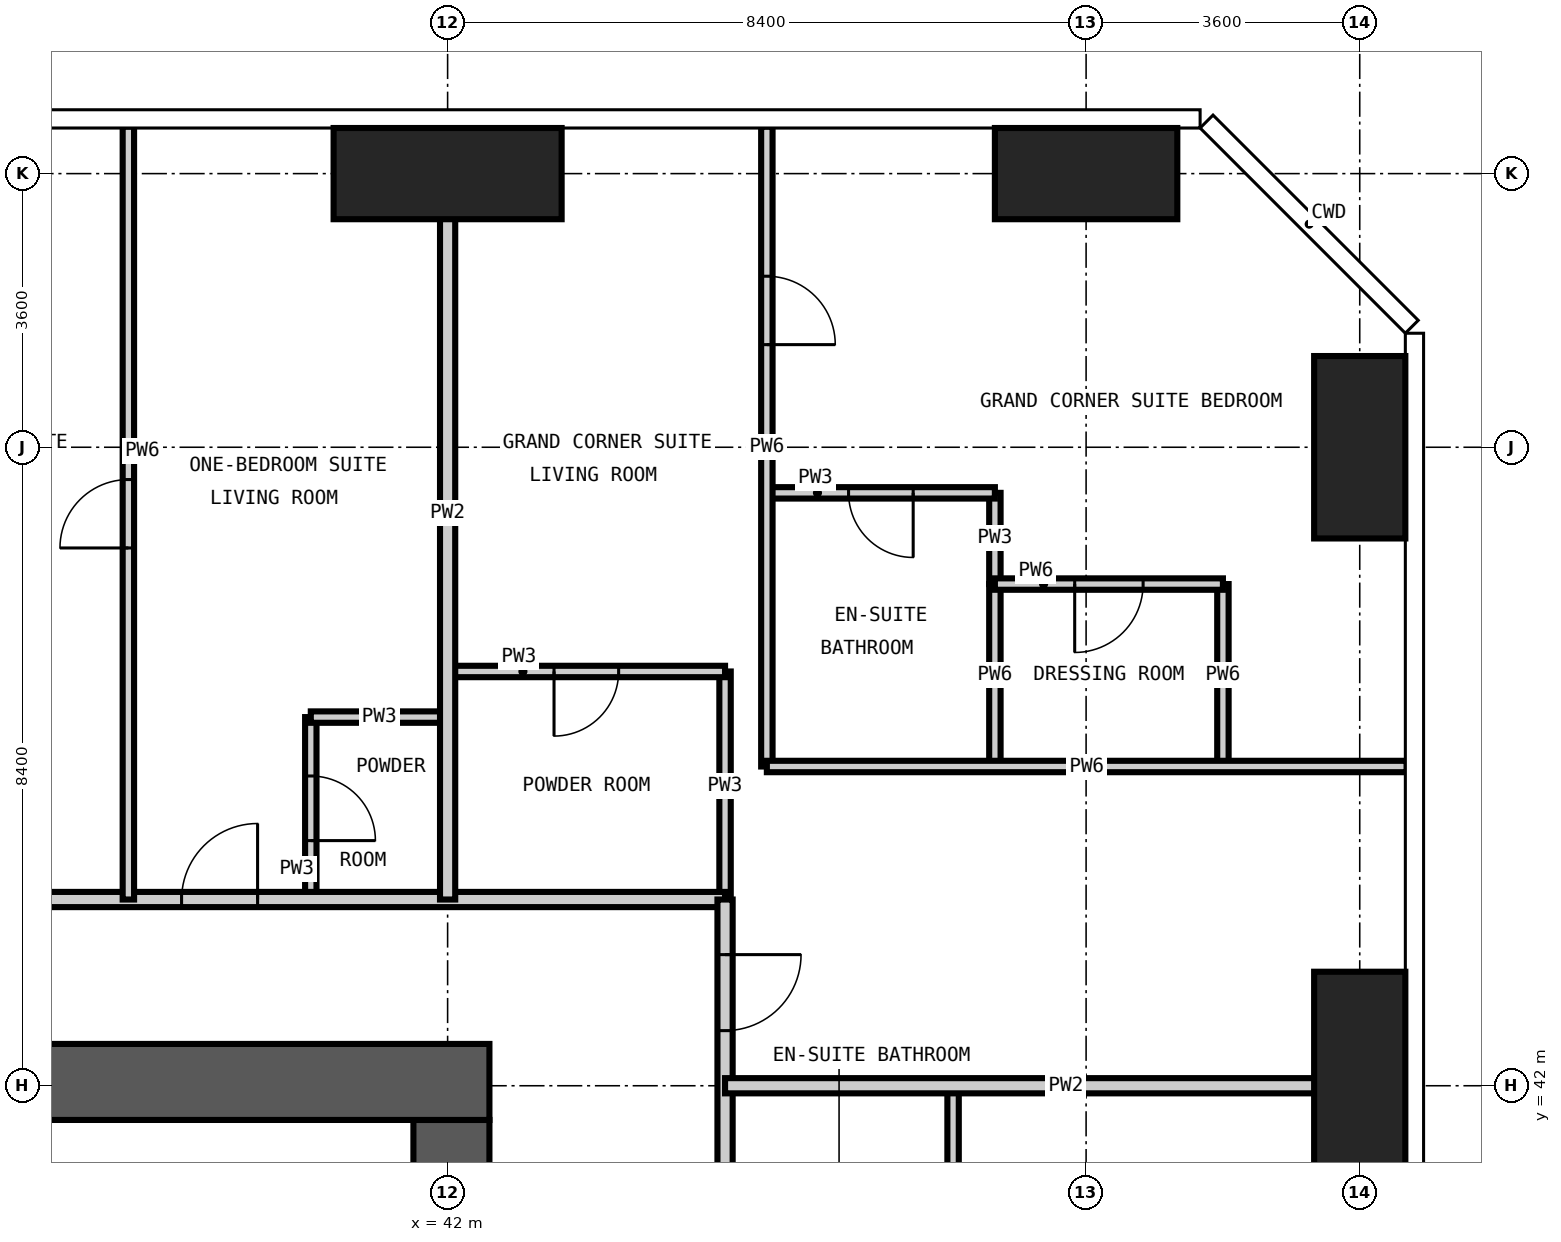
"""IFC4 building model, lengths in metres.
Left out: names, types, materials, properties, quantities, classifications, styles, units other than length and angle.
Written with IfcOpenShell. Run it as: python <this file> out.ifc"""

import sys

from ifc_helpers import new_model, si_unit, direction, frame, frame_2d, origin, origin_2d, place, context, subcontext, project, spatial, rectangle, extrude, element, fill, save


model = new_model("IFC4")
c1 = context("Model", 3, precision=1e-05, world=origin(), true_north=direction((0.0, 1.0)))
c2 = subcontext(c1, "Body", "Model", "MODEL_VIEW")
j1 = project(units=[si_unit("LENGTHUNIT", "METRE"), si_unit("PLANEANGLEUNIT", "RADIAN")], contexts=[c1])
p1 = place(None, origin())
s1 = spatial("IfcSite", under=j1, at=p1, CompositionType="ELEMENT")
p2 = place(p1, origin())
s2 = spatial("IfcBuilding", under=s1, at=p2, CompositionType="ELEMENT")
p3 = place(p2, frame((0.0, 0.0, 225.6)))
s3 = spatial("IfcBuildingStorey", under=s2, at=p3, CompositionType="ELEMENT", Elevation=225.6)
p4 = place(p3, frame((42.0, 54.0, -0.35), z_axis=(0.0, 0.0, 1.0), x_axis=(1.0, 0.0, 0.0)))
e1 = element("IfcColumn", 1, at=p4, inside=s3, PredefinedType="COLUMN", context=c2, shape_type="SweptSolid", body=[
    extrude(rectangle(XDim=3.0, YDim=1.2, at=origin_2d()), origin(), (0.0, 0.0, 1.0), 3.9),
])
p5 = place(p3, frame((50.4, 54.0, -0.35), z_axis=(0.0, 0.0, 1.0), x_axis=(1.0, 0.0, 0.0)))
e2 = element("IfcColumn", 2, at=p5, inside=s3, PredefinedType="COLUMN", context=c2, shape_type="SweptSolid", body=[
    extrude(rectangle(XDim=2.4, YDim=1.2, at=origin_2d()), origin(), (0.0, 0.0, 1.0), 3.9),
])
p6 = place(p3, frame((54.0, 42.0, -0.35), z_axis=(0.0, 0.0, 1.0), x_axis=(1.0, 0.0, 0.0)))
e3 = element("IfcColumn", 3, at=p6, inside=s3, PredefinedType="COLUMN", context=c2, shape_type="SweptSolid", body=[
    extrude(rectangle(XDim=1.2, YDim=3.0, at=origin_2d()), origin(), (0.0, 0.0, 1.0), 3.9),
])
p7 = place(p3, frame((54.0, 50.4, -0.35), z_axis=(0.0, 0.0, 1.0), x_axis=(1.0, 0.0, 0.0)))
e4 = element("IfcColumn", 4, at=p7, inside=s3, PredefinedType="COLUMN", context=c2, shape_type="SweptSolid", body=[
    extrude(rectangle(XDim=1.2, YDim=2.4, at=origin_2d()), origin(), (0.0, 0.0, 1.0), 3.9),
])
p8 = place(p3, frame((42.05, 17.25, -0.35), z_axis=(0.0, 0.0, 1.0), x_axis=(0.0, 1.0, 0.0)))
e5 = element("IfcWall", 5, at=p8, inside=s3, PredefinedType="SHEAR", context=c2, shape_type="SweptSolid", body=[
    extrude(rectangle(XDim=24.3, YDim=1.0, at=frame_2d((12.15, 0.0))), origin(), (0.0, 0.0, 1.0), 3.9),
])
p9 = place(p8, frame((0.35, 0.0, 0.35)))
e6 = element("IfcOpeningElement", 6, at=p9, cuts=e5, PredefinedType="OPENING", context=c2, shape_type="SweptSolid", body=[
    extrude(rectangle(XDim=1.2, YDim=2.2, at=frame_2d((0.6, 1.1))), frame((0.0, 0.51, 0.0), z_axis=(0.0, -1.0, 0.0), x_axis=(1.0, 0.0, 0.0)), (0.0, 0.0, 1.0), 1.02),
])
p10 = place(p8, frame((11.25, 0.0, 0.35)))
e7 = element("IfcOpeningElement", 7, at=p10, cuts=e5, PredefinedType="OPENING", context=c2, shape_type="SweptSolid", body=[
    extrude(rectangle(XDim=1.8, YDim=2.2, at=frame_2d((0.9, 1.1))), frame((0.0, 0.51, 0.0), z_axis=(0.0, -1.0, 0.0), x_axis=(1.0, 0.0, 0.0)), (0.0, 0.0, 1.0), 1.02),
])
p11 = place(p8, frame((20.05, 0.0, 0.35)))
e8 = element("IfcOpeningElement", 8, at=p11, cuts=e5, PredefinedType="OPENING", context=c2, shape_type="SweptSolid", body=[
    extrude(rectangle(XDim=1.0, YDim=2.1, at=frame_2d((0.5, 1.05))), frame((0.0, 0.51, 0.0), z_axis=(0.0, -1.0, 0.0), x_axis=(1.0, 0.0, 0.0)), (0.0, 0.0, 1.0), 1.02),
])
p12 = place(p3, frame((42.55, 42.05, -0.35), z_axis=(0.0, 0.0, 1.0), x_axis=(-1.0, 0.0, 0.0)))
e9 = element("IfcWall", 9, at=p12, inside=s3, PredefinedType="SHEAR", context=c2, shape_type="SweptSolid", body=[
    extrude(rectangle(XDim=18.125, YDim=1.0, at=frame_2d((9.062, 0.0))), origin(), (0.0, 0.0, 1.0), 3.9),
])
p13 = place(p12, frame((10.45, 0.0, 0.35)))
e10 = element("IfcOpeningElement", 10, at=p13, cuts=e9, PredefinedType="OPENING", context=c2, shape_type="SweptSolid", body=[
    extrude(rectangle(XDim=1.2, YDim=2.2, at=frame_2d((0.6, 1.1))), frame((0.0, 0.51, 0.0), z_axis=(0.0, -1.0, 0.0), x_axis=(1.0, 0.0, 0.0)), (0.0, 0.0, 1.0), 1.02),
])
p14 = place(p3, frame((40.2, 44.45, 0.0), z_axis=(0.0, 0.0, 1.0), x_axis=(0.0, 1.0, 0.0)))
e11 = element("IfcWall", 11, at=p14, inside=s3, PredefinedType="PARTITIONING", context=c2, shape_type="SweptSolid", body=[
    extrude(rectangle(XDim=2.4, YDim=0.15, at=frame_2d((1.2, 0.0))), origin(), (0.0, 0.0, 1.0), 3.55),
])
p15 = place(p14, frame((0.775, 0.0, 0.0)))
e12 = element("IfcOpeningElement", 12, at=p15, cuts=e11, PredefinedType="OPENING", context=c2, shape_type="SweptSolid", body=[
    extrude(rectangle(XDim=0.85, YDim=2.1, at=frame_2d((0.425, 1.05))), frame((0.0, 0.085, 0.0), z_axis=(0.0, -1.0, 0.0), x_axis=(1.0, 0.0, 0.0)), (0.0, 0.0, 1.0), 0.17),
])
p16 = place(p3, frame((45.65, 44.45, 0.0), z_axis=(0.0, 0.0, 1.0), x_axis=(0.0, 1.0, 0.0)))
e13 = element("IfcWall", 13, at=p16, inside=s3, PredefinedType="PARTITIONING", context=c2, shape_type="SweptSolid", body=[
    extrude(rectangle(XDim=3.0, YDim=0.15, at=frame_2d((1.5, 0.0))), origin(), (0.0, 0.0, 1.0), 3.55),
])
p17 = place(p3, frame((48.65, 39.6, 0.0), z_axis=(0.0, 0.0, 1.0), x_axis=(0.0, 1.0, 0.0)))
e14 = element("IfcWall", 14, at=p17, inside=s3, PredefinedType="PARTITIONING", context=c2, shape_type="SweptSolid", body=[
    extrude(rectangle(XDim=2.4, YDim=0.15, at=frame_2d((1.2, 0.0))), origin(), (0.0, 0.0, 1.0), 3.55),
])
p18 = place(p3, frame((49.2, 48.6, 0.0), z_axis=(0.0, 0.0, 1.0), x_axis=(0.0, 1.0, 0.0)))
e15 = element("IfcWall", 15, at=p18, inside=s3, PredefinedType="PARTITIONING", context=c2, shape_type="SweptSolid", body=[
    extrude(rectangle(XDim=1.2, YDim=0.15, at=frame_2d((0.6, 0.0))), origin(), (0.0, 0.0, 1.0), 3.55),
])
p19 = place(p3, frame((40.2, 46.85, 0.0), z_axis=(0.0, 0.0, 1.0), x_axis=(1.0, 0.0, 0.0)))
e16 = element("IfcWall", 16, at=p19, inside=s3, PredefinedType="PARTITIONING", context=c2, shape_type="SweptSolid", body=[
    extrude(rectangle(XDim=1.8, YDim=0.15, at=frame_2d((0.9, 0.0))), origin(), (0.0, 0.0, 1.0), 3.55),
])
p20 = place(p3, frame((42.0, 47.45, 0.0), z_axis=(0.0, 0.0, 1.0), x_axis=(1.0, 0.0, 0.0)))
e17 = element("IfcWall", 17, at=p20, inside=s3, PredefinedType="PARTITIONING", context=c2, shape_type="SweptSolid", body=[
    extrude(rectangle(XDim=3.65, YDim=0.15, at=frame_2d((1.825, 0.0))), origin(), (0.0, 0.0, 1.0), 3.55),
])
p21 = place(p20, frame((1.4, 0.0, 0.0)))
e18 = element("IfcOpeningElement", 18, at=p21, cuts=e17, PredefinedType="OPENING", context=c2, shape_type="SweptSolid", body=[
    extrude(rectangle(XDim=0.85, YDim=2.1, at=frame_2d((0.425, 1.05))), frame((0.0, 0.085, 0.0), z_axis=(0.0, -1.0, 0.0), x_axis=(1.0, 0.0, 0.0)), (0.0, 0.0, 1.0), 0.17),
])
p22 = place(p3, frame((46.2, 49.8, 0.0), z_axis=(0.0, 0.0, 1.0), x_axis=(1.0, 0.0, 0.0)))
e19 = element("IfcWall", 19, at=p22, inside=s3, PredefinedType="PARTITIONING", context=c2, shape_type="SweptSolid", body=[
    extrude(rectangle(XDim=3.0, YDim=0.15, at=frame_2d((1.5, 0.0))), origin(), (0.0, 0.0, 1.0), 3.55),
])
p23 = place(p22, frame((1.075, 0.0, 0.0)))
e20 = element("IfcOpeningElement", 20, at=p23, cuts=e19, PredefinedType="OPENING", context=c2, shape_type="SweptSolid", body=[
    extrude(rectangle(XDim=0.85, YDim=2.1, at=frame_2d((0.425, 1.05))), frame((0.0, 0.085, 0.0), z_axis=(0.0, -1.0, 0.0), x_axis=(1.0, 0.0, 0.0)), (0.0, 0.0, 1.0), 0.17),
])
p24 = place(p3, frame((21.925, 44.45, 0.0), z_axis=(0.0, 0.0, 1.0), x_axis=(1.0, 0.0, 0.0)))
e21 = element("IfcWall", 21, at=p24, inside=s3, PredefinedType="PARTITIONING", context=c2, shape_type="SweptSolid", body=[
    extrude(rectangle(XDim=23.725, YDim=0.2, at=frame_2d((11.862, 0.0))), origin(), (0.0, 0.0, 1.0), 3.55),
])
p25 = place(p24, frame((5.775, 0.0, 0.0)))
e22 = element("IfcOpeningElement", 22, at=p25, cuts=e21, PredefinedType="OPENING", context=c2, shape_type="SweptSolid", body=[
    extrude(rectangle(XDim=1.0, YDim=2.2, at=frame_2d((0.5, 1.1))), frame((0.0, 0.11, 0.0), z_axis=(0.0, -1.0, 0.0), x_axis=(1.0, 0.0, 0.0)), (0.0, 0.0, 1.0), 0.22),
])
p26 = place(p24, frame((16.575, 0.0, 0.0)))
e23 = element("IfcOpeningElement", 23, at=p26, cuts=e21, PredefinedType="OPENING", context=c2, shape_type="SweptSolid", body=[
    extrude(rectangle(XDim=1.0, YDim=2.2, at=frame_2d((0.5, 1.1))), frame((0.0, 0.11, 0.0), z_axis=(0.0, -1.0, 0.0), x_axis=(1.0, 0.0, 0.0)), (0.0, 0.0, 1.0), 0.22),
])
p27 = place(p3, frame((45.65, 44.45, 0.0), z_axis=(0.0, 0.0, 1.0), x_axis=(0.0, -1.0, 0.0)))
e24 = element("IfcWall", 24, at=p27, inside=s3, PredefinedType="PARTITIONING", context=c2, shape_type="SweptSolid", body=[
    extrude(rectangle(XDim=15.05, YDim=0.2, at=frame_2d((7.525, 0.0))), origin(), (0.0, 0.0, 1.0), 3.55),
])
p28 = place(p27, frame((8.25, 0.0, 0.0)))
e25 = element("IfcOpeningElement", 25, at=p28, cuts=e24, PredefinedType="OPENING", context=c2, shape_type="SweptSolid", body=[
    extrude(rectangle(XDim=1.0, YDim=2.2, at=frame_2d((0.5, 1.1))), frame((0.0, 0.11, 0.0), z_axis=(0.0, -1.0, 0.0), x_axis=(1.0, 0.0, 0.0)), (0.0, 0.0, 1.0), 0.22),
])
p29 = place(p27, frame((0.725, 0.0, 0.0)))
e26 = element("IfcOpeningElement", 26, at=p29, cuts=e24, PredefinedType="OPENING", context=c2, shape_type="SweptSolid", body=[
    extrude(rectangle(XDim=1.0, YDim=2.2, at=frame_2d((0.5, 1.1))), frame((0.0, 0.11, 0.0), z_axis=(0.0, -1.0, 0.0), x_axis=(1.0, 0.0, 0.0)), (0.0, 0.0, 1.0), 0.22),
])
p30 = place(p3, frame((42.0, 44.45, 0.0), z_axis=(0.0, 0.0, 1.0), x_axis=(0.0, 1.0, 0.0)))
e27 = element("IfcWall", 27, at=p30, inside=s3, PredefinedType="PARTITIONING", context=c2, shape_type="SweptSolid", body=[
    extrude(rectangle(XDim=10.168, YDim=0.2, at=frame_2d((5.084, 0.0))), origin(), (0.0, 0.0, 1.0), 3.55),
])
p31 = place(p3, frame((45.65, 42.0, 0.0), z_axis=(0.0, 0.0, 1.0), x_axis=(1.0, 0.0, 0.0)))
e28 = element("IfcWall", 28, at=p31, inside=s3, PredefinedType="PARTITIONING", context=c2, shape_type="SweptSolid", body=[
    extrude(rectangle(XDim=8.968, YDim=0.2, at=frame_2d((4.484, 0.0))), origin(), (0.0, 0.0, 1.0), 3.55),
])
p32 = place(p3, frame((37.8, 44.45, 0.0), z_axis=(0.0, 0.0, 1.0), x_axis=(0.0, 1.0, 0.0)))
e29 = element("IfcWall", 29, at=p32, inside=s3, PredefinedType="PARTITIONING", context=c2, shape_type="SweptSolid", body=[
    extrude(rectangle(XDim=10.168, YDim=0.15, at=frame_2d((5.084, 0.0))), origin(), (0.0, 0.0, 1.0), 3.55),
])
p33 = place(p32, frame((4.625, 0.0, 0.0)))
e30 = element("IfcOpeningElement", 30, at=p33, cuts=e29, PredefinedType="OPENING", context=c2, shape_type="SweptSolid", body=[
    extrude(rectangle(XDim=0.9, YDim=2.1, at=frame_2d((0.45, 1.05))), frame((0.0, 0.085, 0.0), z_axis=(0.0, -1.0, 0.0), x_axis=(1.0, 0.0, 0.0)), (0.0, 0.0, 1.0), 0.17),
])
p34 = place(p3, frame((46.2, 46.2, 0.0), z_axis=(0.0, 0.0, 1.0), x_axis=(0.0, 1.0, 0.0)))
e31 = element("IfcWall", 31, at=p34, inside=s3, PredefinedType="PARTITIONING", context=c2, shape_type="SweptSolid", body=[
    extrude(rectangle(XDim=8.418, YDim=0.15, at=frame_2d((4.209, 0.0))), origin(), (0.0, 0.0, 1.0), 3.55),
])
p35 = place(p34, frame((5.55, 0.0, 0.0)))
e32 = element("IfcOpeningElement", 32, at=p35, cuts=e31, PredefinedType="OPENING", context=c2, shape_type="SweptSolid", body=[
    extrude(rectangle(XDim=0.9, YDim=2.1, at=frame_2d((0.45, 1.05))), frame((0.0, 0.085, 0.0), z_axis=(0.0, -1.0, 0.0), x_axis=(1.0, 0.0, 0.0)), (0.0, 0.0, 1.0), 0.17),
])
for number, where, z_axis, x_axis in (
    (33, (49.2, 46.2, 0.0), (0.0, 0.0, 1.0), (0.0, 1.0, 0.0)),
    (34, (52.2, 46.2, 0.0), (0.0, 0.0, 1.0), (0.0, 1.0, 0.0)),
):
    element("IfcWall", number, at=place(p3, frame(where, z_axis=z_axis, x_axis=x_axis)), inside=s3, PredefinedType="PARTITIONING", context=c2, shape_type="SweptSolid", body=[
        extrude(rectangle(XDim=2.4, YDim=0.15, at=frame_2d((1.2, 0.0))), origin(), (0.0, 0.0, 1.0), 3.55),
    ])
p36 = place(p3, frame((46.2, 46.2, 0.0), z_axis=(0.0, 0.0, 1.0), x_axis=(1.0, 0.0, 0.0)))
e35 = element("IfcWall", 35, at=p36, inside=s3, PredefinedType="PARTITIONING", context=c2, shape_type="SweptSolid", body=[
    extrude(rectangle(XDim=8.418, YDim=0.15, at=frame_2d((4.209, 0.0))), origin(), (0.0, 0.0, 1.0), 3.55),
])
p37 = place(p3, frame((49.2, 48.6, 0.0), z_axis=(0.0, 0.0, 1.0), x_axis=(1.0, 0.0, 0.0)))
e36 = element("IfcWall", 36, at=p37, inside=s3, PredefinedType="PARTITIONING", context=c2, shape_type="SweptSolid", body=[
    extrude(rectangle(XDim=3.0, YDim=0.15, at=frame_2d((1.5, 0.0))), origin(), (0.0, 0.0, 1.0), 3.55),
])
p38 = place(p37, frame((1.05, 0.0, 0.0)))
e37 = element("IfcOpeningElement", 37, at=p38, cuts=e36, PredefinedType="OPENING", context=c2, shape_type="SweptSolid", body=[
    extrude(rectangle(XDim=0.9, YDim=2.1, at=frame_2d((0.45, 1.05))), frame((0.0, 0.085, 0.0), z_axis=(0.0, -1.0, 0.0), x_axis=(1.0, 0.0, 0.0)), (0.0, 0.0, 1.0), 0.17),
])
p39 = place(p26, origin())
e38 = element("IfcDoor", 38, at=p39, inside=s3, OperationType="SINGLE_SWING_RIGHT", PredefinedType="DOOR", context=c2, shape_type="SweptSolid", body=[
    extrude(rectangle(XDim=1.0, YDim=2.2, at=frame_2d((0.5, 1.1))), frame((0.0, 0.025, 0.0), z_axis=(0.0, -1.0, 0.0), x_axis=(1.0, 0.0, 0.0)), (0.0, 0.0, 1.0), 0.05),
])
fill(e23, e38)
p40 = place(p15, frame((0.85, 0.0, 0.0), z_axis=(0.0, 0.0, 1.0), x_axis=(-1.0, 0.0, 0.0)))
e39 = element("IfcDoor", 39, at=p40, inside=s3, OperationType="SINGLE_SWING_RIGHT", PredefinedType="DOOR", context=c2, shape_type="SweptSolid", body=[
    extrude(rectangle(XDim=0.85, YDim=2.1, at=frame_2d((0.425, 1.05))), frame((0.0, 0.025, 0.0), z_axis=(0.0, -1.0, 0.0), x_axis=(1.0, 0.0, 0.0)), (0.0, 0.0, 1.0), 0.05),
])
fill(e12, e39)
p41 = place(p33, origin())
e40 = element("IfcDoor", 40, at=p41, inside=s3, OperationType="SINGLE_SWING_LEFT", PredefinedType="DOOR", context=c2, shape_type="SweptSolid", body=[
    extrude(rectangle(XDim=0.9, YDim=2.1, at=frame_2d((0.45, 1.05))), frame((0.0, 0.025, 0.0), z_axis=(0.0, -1.0, 0.0), x_axis=(1.0, 0.0, 0.0)), (0.0, 0.0, 1.0), 0.05),
])
fill(e30, e40)
p42 = place(p29, origin())
e41 = element("IfcDoor", 41, at=p42, inside=s3, OperationType="SINGLE_SWING_LEFT", PredefinedType="DOOR", context=c2, shape_type="SweptSolid", body=[
    extrude(rectangle(XDim=1.0, YDim=2.2, at=frame_2d((0.5, 1.1))), frame((0.0, 0.025, 0.0), z_axis=(0.0, -1.0, 0.0), x_axis=(1.0, 0.0, 0.0)), (0.0, 0.0, 1.0), 0.05),
])
fill(e26, e41)
p43 = place(p21, frame((0.85, 0.0, 0.0), z_axis=(0.0, 0.0, 1.0), x_axis=(-1.0, 0.0, 0.0)))
e42 = element("IfcDoor", 42, at=p43, inside=s3, OperationType="SINGLE_SWING_RIGHT", PredefinedType="DOOR", context=c2, shape_type="SweptSolid", body=[
    extrude(rectangle(XDim=0.85, YDim=2.1, at=frame_2d((0.425, 1.05))), frame((0.0, 0.025, 0.0), z_axis=(0.0, -1.0, 0.0), x_axis=(1.0, 0.0, 0.0)), (0.0, 0.0, 1.0), 0.05),
])
fill(e18, e42)
p44 = place(p35, frame((0.9, 0.0, 0.0), z_axis=(0.0, 0.0, 1.0), x_axis=(-1.0, 0.0, 0.0)))
e43 = element("IfcDoor", 43, at=p44, inside=s3, OperationType="SINGLE_SWING_RIGHT", PredefinedType="DOOR", context=c2, shape_type="SweptSolid", body=[
    extrude(rectangle(XDim=0.9, YDim=2.1, at=frame_2d((0.45, 1.05))), frame((0.0, 0.025, 0.0), z_axis=(0.0, -1.0, 0.0), x_axis=(1.0, 0.0, 0.0)), (0.0, 0.0, 1.0), 0.05),
])
fill(e32, e43)
p45 = place(p23, frame((0.85, 0.0, 0.0), z_axis=(0.0, 0.0, 1.0), x_axis=(-1.0, 0.0, 0.0)))
e44 = element("IfcDoor", 44, at=p45, inside=s3, OperationType="SINGLE_SWING_LEFT", PredefinedType="DOOR", context=c2, shape_type="SweptSolid", body=[
    extrude(rectangle(XDim=0.85, YDim=2.1, at=frame_2d((0.425, 1.05))), frame((0.0, 0.025, 0.0), z_axis=(0.0, -1.0, 0.0), x_axis=(1.0, 0.0, 0.0)), (0.0, 0.0, 1.0), 0.05),
])
fill(e20, e44)
p46 = place(p38, frame((0.9, 0.0, 0.0), z_axis=(0.0, 0.0, 1.0), x_axis=(-1.0, 0.0, 0.0)))
e45 = element("IfcDoor", 45, at=p46, inside=s3, OperationType="SINGLE_SWING_RIGHT", PredefinedType="DOOR", context=c2, shape_type="SweptSolid", body=[
    extrude(rectangle(XDim=0.9, YDim=2.1, at=frame_2d((0.45, 1.05))), frame((0.0, 0.025, 0.0), z_axis=(0.0, -1.0, 0.0), x_axis=(1.0, 0.0, 0.0)), (0.0, 0.0, 1.0), 0.05),
])
fill(e37, e45)
save(model, sys.argv[1])
